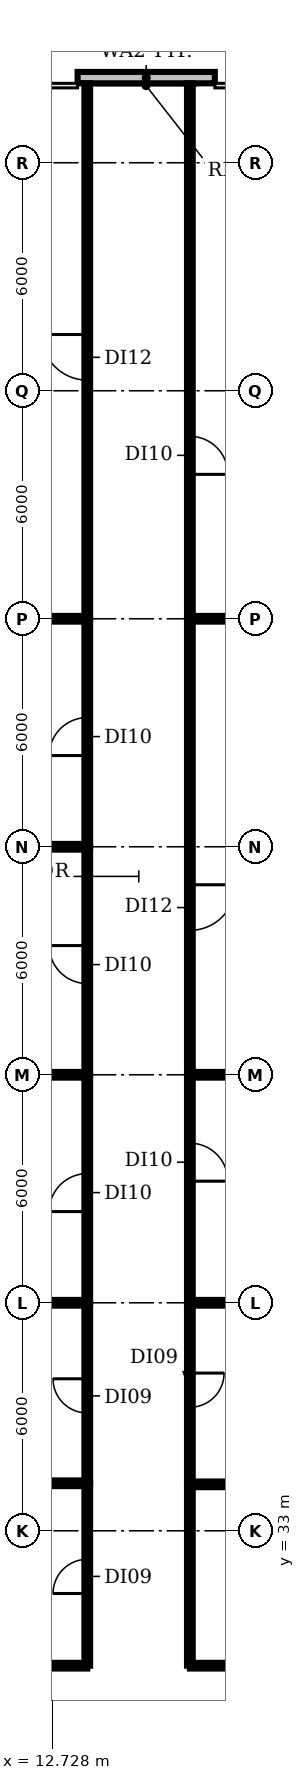
"""IFC4 building model, lengths in metres.
Left out: names, types, materials, properties, quantities, classifications, styles, units other than length and angle.
Written with IfcOpenShell. Run it as: python <this file> out.ifc"""

import sys

from ifc_helpers import new_model, si_unit, direction, frame, frame_2d, origin, place, context, subcontext, project, spatial, rectangle, extrude, element, fill, save


model = new_model("IFC4")
c1 = context("Model", 3, precision=1e-05, world=origin(), true_north=direction((0.0, 1.0)))
c2 = subcontext(c1, "Body", "Model", "MODEL_VIEW")
j1 = project(units=[si_unit("LENGTHUNIT", "METRE"), si_unit("PLANEANGLEUNIT", "RADIAN")], contexts=[c1])
p1 = place(None, origin())
s1 = spatial("IfcSite", under=j1, at=p1, CompositionType="ELEMENT")
p2 = place(p1, origin())
s2 = spatial("IfcBuilding", under=s1, at=p2, CompositionType="ELEMENT")
p3 = place(p2, frame((0.0, 0.0, 117.2)))
s3 = spatial("IfcBuildingStorey", under=s2, at=p3, CompositionType="ELEMENT", Elevation=117.2)
p4 = place(p3, frame((17.006, 71.24, 0.0), z_axis=(0.0, 0.0, 1.0), x_axis=(-1.0, 0.0, 0.0)))
e1 = element("IfcWall", 1, at=p4, inside=s3, PredefinedType="SOLIDWALL", context=c2, shape_type="SweptSolid", body=[
    extrude(rectangle(XDim=3.61, YDim=0.3, at=frame_2d((1.805, 0.0))), origin(), (0.0, 0.0, 1.0), 3.85),
])
for number, where, z_axis, x_axis in (
    (2, (-0.98, 34.25, 0.0), (0.0, 0.0, 1.0), (1.0, 0.0, 0.0)),
    (3, (-0.98, 39.0, 0.0), (0.0, 0.0, 1.0), (1.0, 0.0, 0.0)),
    (4, (-0.98, 45.0, 0.0), (0.0, 0.0, 1.0), (1.0, 0.0, 0.0)),
    (5, (-0.98, 51.0, 0.0), (0.0, 0.0, 1.0), (1.0, 0.0, 0.0)),
    (6, (-0.98, 57.0, 0.0), (0.0, 0.0, 1.0), (1.0, 0.0, 0.0)),
):
    element("IfcWall", number, at=place(p3, frame(where, z_axis=z_axis, x_axis=x_axis)), inside=s3, PredefinedType="PARTITIONING", context=c2, shape_type="SweptSolid", body=[
        extrude(rectangle(XDim=14.63, YDim=0.15, at=frame_2d((7.315, 0.0))), origin(), (0.0, 0.0, 1.0), 2.83),
    ])
p5 = place(p3, frame((6.0, 29.45, 0.0), z_axis=(0.0, 0.0, 1.0), x_axis=(1.0, 0.0, 0.0)))
e7 = element("IfcWall", 7, at=p5, inside=s3, PredefinedType="PARTITIONING", context=c2, shape_type="SweptSolid", body=[
    extrude(rectangle(XDim=7.65, YDim=0.15, at=frame_2d((3.825, 0.0))), origin(), (0.0, 0.0, 1.0), 2.83),
])
p6 = place(p3, frame((13.65, 29.45, 0.0), z_axis=(0.0, 0.0, 1.0), x_axis=(0.0, 1.0, 0.0)))
e8 = element("IfcWall", 8, at=p6, inside=s3, PredefinedType="PARTITIONING", context=c2, shape_type="SweptSolid", body=[
    extrude(rectangle(XDim=4.8, YDim=0.15, at=frame_2d((2.4, 0.0))), origin(), (0.0, 0.0, 1.0), 2.83),
])
p7 = place(p6, frame((1.9, 0.0, 0.0)))
e9 = element("IfcOpeningElement", 9, at=p7, cuts=e8, PredefinedType="OPENING", context=c2, shape_type="SweptSolid", body=[
    extrude(rectangle(XDim=0.9, YDim=2.1, at=frame_2d((0.45, 1.05))), frame((0.0, 0.085, 0.0), z_axis=(0.0, -1.0, 0.0), x_axis=(1.0, 0.0, 0.0)), (0.0, 0.0, 1.0), 0.17),
])
p8 = place(p3, frame((13.65, 34.25, 0.0), z_axis=(0.0, 0.0, 1.0), x_axis=(0.0, 1.0, 0.0)))
e10 = element("IfcWall", 10, at=p8, inside=s3, PredefinedType="PARTITIONING", context=c2, shape_type="SweptSolid", body=[
    extrude(rectangle(XDim=4.75, YDim=0.15, at=frame_2d((2.375, 0.0))), origin(), (0.0, 0.0, 1.0), 2.83),
])
p9 = place(p8, frame((1.85, 0.0, 0.0)))
e11 = element("IfcOpeningElement", 11, at=p9, cuts=e10, PredefinedType="OPENING", context=c2, shape_type="SweptSolid", body=[
    extrude(rectangle(XDim=0.9, YDim=2.1, at=frame_2d((0.45, 1.05))), frame((0.0, 0.085, 0.0), z_axis=(0.0, -1.0, 0.0), x_axis=(1.0, 0.0, 0.0)), (0.0, 0.0, 1.0), 0.17),
])
p10 = place(p3, frame((13.65, 39.0, 0.0), z_axis=(0.0, 0.0, 1.0), x_axis=(0.0, 1.0, 0.0)))
e12 = element("IfcWall", 12, at=p10, inside=s3, PredefinedType="PARTITIONING", context=c2, shape_type="SweptSolid", body=[
    extrude(rectangle(XDim=6.0, YDim=0.15, at=frame_2d((3.0, 0.0))), origin(), (0.0, 0.0, 1.0), 2.83),
])
p11 = place(p10, frame((2.4, 0.0, 0.0)))
e13 = element("IfcOpeningElement", 13, at=p11, cuts=e12, PredefinedType="OPENING", context=c2, shape_type="SweptSolid", body=[
    extrude(rectangle(XDim=1.0, YDim=2.1, at=frame_2d((0.5, 1.05))), frame((0.0, 0.085, 0.0), z_axis=(0.0, -1.0, 0.0), x_axis=(1.0, 0.0, 0.0)), (0.0, 0.0, 1.0), 0.17),
])
p12 = place(p3, frame((13.65, 45.0, 0.0), z_axis=(0.0, 0.0, 1.0), x_axis=(0.0, 1.0, 0.0)))
e14 = element("IfcWall", 14, at=p12, inside=s3, PredefinedType="PARTITIONING", context=c2, shape_type="SweptSolid", body=[
    extrude(rectangle(XDim=6.0, YDim=0.15, at=frame_2d((3.0, 0.0))), origin(), (0.0, 0.0, 1.0), 2.83),
])
p13 = place(p12, frame((2.4, 0.0, 0.0)))
e15 = element("IfcOpeningElement", 15, at=p13, cuts=e14, PredefinedType="OPENING", context=c2, shape_type="SweptSolid", body=[
    extrude(rectangle(XDim=1.0, YDim=2.1, at=frame_2d((0.5, 1.05))), frame((0.0, 0.085, 0.0), z_axis=(0.0, -1.0, 0.0), x_axis=(1.0, 0.0, 0.0)), (0.0, 0.0, 1.0), 0.17),
])
p14 = place(p3, frame((13.65, 51.0, 0.0), z_axis=(0.0, 0.0, 1.0), x_axis=(0.0, 1.0, 0.0)))
e16 = element("IfcWall", 16, at=p14, inside=s3, PredefinedType="PARTITIONING", context=c2, shape_type="SweptSolid", body=[
    extrude(rectangle(XDim=6.0, YDim=0.15, at=frame_2d((3.0, 0.0))), origin(), (0.0, 0.0, 1.0), 2.83),
])
p15 = place(p14, frame((2.4, 0.0, 0.0)))
e17 = element("IfcOpeningElement", 17, at=p15, cuts=e16, PredefinedType="OPENING", context=c2, shape_type="SweptSolid", body=[
    extrude(rectangle(XDim=1.0, YDim=2.1, at=frame_2d((0.5, 1.05))), frame((0.0, 0.085, 0.0), z_axis=(0.0, -1.0, 0.0), x_axis=(1.0, 0.0, 0.0)), (0.0, 0.0, 1.0), 0.17),
])
p16 = place(p3, frame((13.65, 57.0, 0.0), z_axis=(0.0, 0.0, 1.0), x_axis=(0.0, 1.0, 0.0)))
e18 = element("IfcWall", 18, at=p16, inside=s3, PredefinedType="PARTITIONING", context=c2, shape_type="SweptSolid", body=[
    extrude(rectangle(XDim=14.09, YDim=0.15, at=frame_2d((7.045, 0.0))), origin(), (0.0, 0.0, 1.0), 2.83),
])
p17 = place(p16, frame((6.28, 0.0, 0.0)))
e19 = element("IfcOpeningElement", 19, at=p17, cuts=e18, PredefinedType="OPENING", context=c2, shape_type="SweptSolid", body=[
    extrude(rectangle(XDim=1.2, YDim=2.1, at=frame_2d((0.6, 1.05))), frame((0.0, 0.085, 0.0), z_axis=(0.0, -1.0, 0.0), x_axis=(1.0, 0.0, 0.0)), (0.0, 0.0, 1.0), 0.17),
])
p18 = place(p3, frame((16.35, 29.45, 0.0), z_axis=(0.0, 0.0, 1.0), x_axis=(0.0, 1.0, 0.0)))
e20 = element("IfcWall", 20, at=p18, inside=s3, PredefinedType="PARTITIONING", context=c2, shape_type="SweptSolid", body=[
    extrude(rectangle(XDim=4.8, YDim=0.15, at=frame_2d((2.4, 0.0))), origin(), (0.0, 0.0, 1.0), 2.83),
])
p19 = place(p3, frame((16.35, 29.45, 0.0), z_axis=(0.0, 0.0, 1.0), x_axis=(1.0, 0.0, 0.0)))
e21 = element("IfcWall", 21, at=p19, inside=s3, PredefinedType="PARTITIONING", context=c2, shape_type="SweptSolid", body=[
    extrude(rectangle(XDim=7.5, YDim=0.15, at=frame_2d((3.75, 0.0))), origin(), (0.0, 0.0, 1.0), 2.83),
])
p20 = place(p3, frame((16.35, 34.222, 0.0), z_axis=(0.0, 0.0, 1.0), x_axis=(1.0, 0.0, 0.0)))
e22 = element("IfcWall", 22, at=p20, inside=s3, PredefinedType="PARTITIONING", context=c2, shape_type="SweptSolid", body=[
    extrude(rectangle(XDim=8.79, YDim=0.15, at=frame_2d((4.395, 0.0))), origin(), (0.0, 0.0, 1.0), 2.83),
])
p21 = place(p3, frame((16.35, 39.0, 0.0), z_axis=(0.0, 0.0, 1.0), x_axis=(0.0, -1.0, 0.0)))
e23 = element("IfcWall", 23, at=p21, inside=s3, PredefinedType="PARTITIONING", context=c2, shape_type="SweptSolid", body=[
    extrude(rectangle(XDim=4.75, YDim=0.15, at=frame_2d((2.375, 0.0))), origin(), (0.0, 0.0, 1.0), 2.83),
])
p22 = place(p21, frame((1.85, 0.0, 0.0)))
e24 = element("IfcOpeningElement", 24, at=p22, cuts=e23, PredefinedType="OPENING", context=c2, shape_type="SweptSolid", body=[
    extrude(rectangle(XDim=0.9, YDim=2.1, at=frame_2d((0.45, 1.05))), frame((0.0, 0.085, 0.0), z_axis=(0.0, -1.0, 0.0), x_axis=(1.0, 0.0, 0.0)), (0.0, 0.0, 1.0), 0.17),
])
p23 = place(p3, frame((16.35, 39.0, 0.0), z_axis=(0.0, 0.0, 1.0), x_axis=(1.0, 0.0, 0.0)))
e25 = element("IfcWall", 25, at=p23, inside=s3, PredefinedType="PARTITIONING", context=c2, shape_type="SweptSolid", body=[
    extrude(rectangle(XDim=8.78, YDim=0.15, at=frame_2d((4.39, 0.0))), origin(), (0.0, 0.0, 1.0), 2.83),
])
p24 = place(p3, frame((16.35, 45.0, 0.0), z_axis=(0.0, 0.0, 1.0), x_axis=(0.0, -1.0, 0.0)))
e26 = element("IfcWall", 26, at=p24, inside=s3, PredefinedType="PARTITIONING", context=c2, shape_type="SweptSolid", body=[
    extrude(rectangle(XDim=6.0, YDim=0.15, at=frame_2d((3.0, 0.0))), origin(), (0.0, 0.0, 1.0), 2.83),
])
p25 = place(p24, frame((1.8, 0.0, 0.0)))
e27 = element("IfcOpeningElement", 27, at=p25, cuts=e26, PredefinedType="OPENING", context=c2, shape_type="SweptSolid", body=[
    extrude(rectangle(XDim=1.0, YDim=2.1, at=frame_2d((0.5, 1.05))), frame((0.0, 0.085, 0.0), z_axis=(0.0, -1.0, 0.0), x_axis=(1.0, 0.0, 0.0)), (0.0, 0.0, 1.0), 0.17),
])
p26 = place(p3, frame((16.35, 45.0, 0.0), z_axis=(0.0, 0.0, 1.0), x_axis=(1.0, 0.0, 0.0)))
e28 = element("IfcWall", 28, at=p26, inside=s3, PredefinedType="PARTITIONING", context=c2, shape_type="SweptSolid", body=[
    extrude(rectangle(XDim=8.94, YDim=0.15, at=frame_2d((4.47, 0.0))), origin(), (0.0, 0.0, 1.0), 2.83),
])
p27 = place(p3, frame((16.35, 57.0, 0.0), z_axis=(0.0, 0.0, 1.0), x_axis=(0.0, -1.0, 0.0)))
e29 = element("IfcWall", 29, at=p27, inside=s3, PredefinedType="PARTITIONING", context=c2, shape_type="SweptSolid", body=[
    extrude(rectangle(XDim=12.0, YDim=0.15, at=frame_2d((6.0, 0.0))), origin(), (0.0, 0.0, 1.0), 2.83),
])
p28 = place(p27, frame((7.0, 0.0, 0.0)))
e30 = element("IfcOpeningElement", 30, at=p28, cuts=e29, PredefinedType="OPENING", context=c2, shape_type="SweptSolid", body=[
    extrude(rectangle(XDim=1.2, YDim=2.1, at=frame_2d((0.6, 1.05))), frame((0.0, 0.085, 0.0), z_axis=(0.0, -1.0, 0.0), x_axis=(1.0, 0.0, 0.0)), (0.0, 0.0, 1.0), 0.17),
])
p29 = place(p3, frame((16.35, 57.0, 0.0), z_axis=(0.0, 0.0, 1.0), x_axis=(1.0, 0.0, 0.0)))
e31 = element("IfcWall", 31, at=p29, inside=s3, PredefinedType="PARTITIONING", context=c2, shape_type="SweptSolid", body=[
    extrude(rectangle(XDim=9.25, YDim=0.15, at=frame_2d((4.625, 0.0))), origin(), (0.0, 0.0, 1.0), 2.83),
])
p30 = place(p3, frame((16.35, 71.09, 0.0), z_axis=(0.0, 0.0, 1.0), x_axis=(0.0, -1.0, 0.0)))
e32 = element("IfcWall", 32, at=p30, inside=s3, PredefinedType="PARTITIONING", context=c2, shape_type="SweptSolid", body=[
    extrude(rectangle(XDim=14.09, YDim=0.15, at=frame_2d((7.045, 0.0))), origin(), (0.0, 0.0, 1.0), 2.83),
])
p31 = place(p30, frame((9.29, 0.0, 0.0)))
e33 = element("IfcOpeningElement", 33, at=p31, cuts=e32, PredefinedType="OPENING", context=c2, shape_type="SweptSolid", body=[
    extrude(rectangle(XDim=1.0, YDim=2.1, at=frame_2d((0.5, 1.05))), frame((0.0, 0.085, 0.0), z_axis=(0.0, -1.0, 0.0), x_axis=(1.0, 0.0, 0.0)), (0.0, 0.0, 1.0), 0.17),
])
p32 = place(p7, origin())
e34 = element("IfcDoor", 34, at=p32, inside=s3, OperationType="SINGLE_SWING_LEFT", PredefinedType="DOOR", context=c2, shape_type="SweptSolid", body=[
    extrude(rectangle(XDim=0.9, YDim=2.1, at=frame_2d((0.45, 1.05))), frame((0.0, 0.025, 0.0), z_axis=(0.0, -1.0, 0.0), x_axis=(1.0, 0.0, 0.0)), (0.0, 0.0, 1.0), 0.05),
])
fill(e9, e34)
p33 = place(p9, origin())
e35 = element("IfcDoor", 35, at=p33, inside=s3, OperationType="SINGLE_SWING_RIGHT", PredefinedType="DOOR", context=c2, shape_type="SweptSolid", body=[
    extrude(rectangle(XDim=0.9, YDim=2.1, at=frame_2d((0.45, 1.05))), frame((0.0, 0.025, 0.0), z_axis=(0.0, -1.0, 0.0), x_axis=(1.0, 0.0, 0.0)), (0.0, 0.0, 1.0), 0.05),
])
fill(e11, e35)
p34 = place(p11, origin())
e36 = element("IfcDoor", 36, at=p34, inside=s3, OperationType="SINGLE_SWING_LEFT", PredefinedType="DOOR", context=c2, shape_type="SweptSolid", body=[
    extrude(rectangle(XDim=1.0, YDim=2.1, at=frame_2d((0.5, 1.05))), frame((0.0, 0.025, 0.0), z_axis=(0.0, -1.0, 0.0), x_axis=(1.0, 0.0, 0.0)), (0.0, 0.0, 1.0), 0.05),
])
fill(e13, e36)
p35 = place(p13, origin())
e37 = element("IfcDoor", 37, at=p35, inside=s3, OperationType="SINGLE_SWING_RIGHT", PredefinedType="DOOR", context=c2, shape_type="SweptSolid", body=[
    extrude(rectangle(XDim=1.0, YDim=2.1, at=frame_2d((0.5, 1.05))), frame((0.0, 0.025, 0.0), z_axis=(0.0, -1.0, 0.0), x_axis=(1.0, 0.0, 0.0)), (0.0, 0.0, 1.0), 0.05),
])
fill(e15, e37)
p36 = place(p15, origin())
e38 = element("IfcDoor", 38, at=p36, inside=s3, OperationType="SINGLE_SWING_LEFT", PredefinedType="DOOR", context=c2, shape_type="SweptSolid", body=[
    extrude(rectangle(XDim=1.0, YDim=2.1, at=frame_2d((0.5, 1.05))), frame((0.0, 0.025, 0.0), z_axis=(0.0, -1.0, 0.0), x_axis=(1.0, 0.0, 0.0)), (0.0, 0.0, 1.0), 0.05),
])
fill(e17, e38)
p37 = place(p17, origin())
e39 = element("IfcDoor", 39, at=p37, inside=s3, OperationType="SINGLE_SWING_RIGHT", PredefinedType="DOOR", context=c2, shape_type="SweptSolid", body=[
    extrude(rectangle(XDim=1.2, YDim=2.1, at=frame_2d((0.6, 1.05))), frame((0.0, 0.025, 0.0), z_axis=(0.0, -1.0, 0.0), x_axis=(1.0, 0.0, 0.0)), (0.0, 0.0, 1.0), 0.05),
])
fill(e19, e39)
p38 = place(p22, origin())
e40 = element("IfcDoor", 40, at=p38, inside=s3, OperationType="SINGLE_SWING_LEFT", PredefinedType="DOOR", context=c2, shape_type="SweptSolid", body=[
    extrude(rectangle(XDim=0.9, YDim=2.1, at=frame_2d((0.45, 1.05))), frame((0.0, 0.025, 0.0), z_axis=(0.0, -1.0, 0.0), x_axis=(1.0, 0.0, 0.0)), (0.0, 0.0, 1.0), 0.05),
])
fill(e24, e40)
p39 = place(p25, origin())
e41 = element("IfcDoor", 41, at=p39, inside=s3, OperationType="SINGLE_SWING_RIGHT", PredefinedType="DOOR", context=c2, shape_type="SweptSolid", body=[
    extrude(rectangle(XDim=1.0, YDim=2.1, at=frame_2d((0.5, 1.05))), frame((0.0, 0.025, 0.0), z_axis=(0.0, -1.0, 0.0), x_axis=(1.0, 0.0, 0.0)), (0.0, 0.0, 1.0), 0.05),
])
fill(e27, e41)
p40 = place(p28, origin())
e42 = element("IfcDoor", 42, at=p40, inside=s3, OperationType="SINGLE_SWING_LEFT", PredefinedType="DOOR", context=c2, shape_type="SweptSolid", body=[
    extrude(rectangle(XDim=1.2, YDim=2.1, at=frame_2d((0.6, 1.05))), frame((0.0, 0.025, 0.0), z_axis=(0.0, -1.0, 0.0), x_axis=(1.0, 0.0, 0.0)), (0.0, 0.0, 1.0), 0.05),
])
fill(e30, e42)
p41 = place(p31, origin())
e43 = element("IfcDoor", 43, at=p41, inside=s3, OperationType="SINGLE_SWING_RIGHT", PredefinedType="DOOR", context=c2, shape_type="SweptSolid", body=[
    extrude(rectangle(XDim=1.0, YDim=2.1, at=frame_2d((0.5, 1.05))), frame((0.0, 0.025, 0.0), z_axis=(0.0, -1.0, 0.0), x_axis=(1.0, 0.0, 0.0)), (0.0, 0.0, 1.0), 0.05),
])
fill(e33, e43)
save(model, sys.argv[1])
